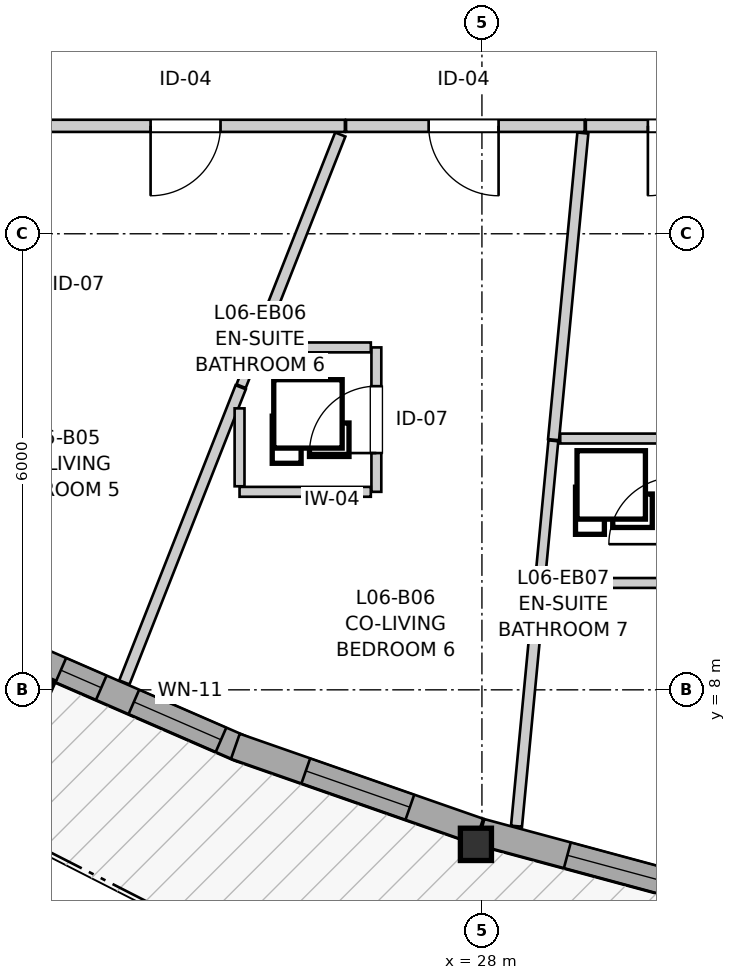
"""IFC4 building model, lengths in metres.
Left out: names, types, materials, properties, quantities, classifications, styles, units other than length and angle.
Written with IfcOpenShell. Run it as: python <this file> out.ifc"""

import sys

from ifc_helpers import new_model, si_unit, direction, frame, frame_2d, origin, origin_2d, place, context, subcontext, project, spatial, rectangle, i_section, extrude, source, transform, mapped, element, fill, save


model = new_model("IFC4")
c1 = context("Model", 3, precision=1e-05, world=origin(), true_north=direction((0.0, 1.0)))
c2 = subcontext(c1, "Body", "Model", "MODEL_VIEW")
j1 = project(units=[si_unit("LENGTHUNIT", "METRE"), si_unit("PLANEANGLEUNIT", "RADIAN")], contexts=[c1])
p1 = place(None, origin())
s1 = spatial("IfcSite", under=j1, at=p1, CompositionType="ELEMENT")
p2 = place(p1, origin())
s2 = spatial("IfcBuilding", under=s1, at=p2, CompositionType="ELEMENT")
p3 = place(p2, frame((0.0, 0.0, 23.8)))
s3 = spatial("IfcBuildingStorey", under=s2, at=p3, CompositionType="ELEMENT", Elevation=23.8)
m1 = source(origin(), c2, "Body", "SweptSolid", [
    extrude(i_section(OverallWidth=0.409, OverallDepth=0.425, WebThickness=0.03, FlangeThickness=0.048, FilletRadius=0.015, at=origin_2d()), origin(), (0.0, 0.0, 1.0), 2.935),
])
p4 = place(p3, frame((27.921, 5.967, 0.0), z_axis=(0.0, 0.0, 1.0), x_axis=(1.0, 0.0, 0.0)))
e1 = element("IfcColumn", 1, at=p4, inside=s3, PredefinedType="PILASTER", context=c2, shape_type="MappedRepresentation", body=[
    mapped(m1, transform((0.0, 0.0, 0.0), x_axis=(1.0, 0.0, 0.0), y_axis=(0.0, 1.0, 0.0), z_axis=(0.0, 0.0, 1.0), scale=1.0)),
])
p5 = place(p3, frame((22.018, 8.451, 0.0), z_axis=(0.0, 0.0, 1.0), x_axis=(0.917071318244, -0.398723208824, 0.0)))
e2 = element("IfcWall", 2, at=p5, inside=s3, PredefinedType="SOLIDWALL", context=c2, shape_type="SweptSolid", body=[
    extrude(rectangle(XDim=3.076, YDim=0.35, at=frame_2d((1.538, 0.0))), origin(), (0.0, 0.0, 1.0), 2.415),
])
p6 = place(p5, frame((0.481, 0.0, 0.82)))
e3 = element("IfcOpeningElement", 3, at=p6, cuts=e2, PredefinedType="OPENING", context=c2, shape_type="SweptSolid", body=[
    extrude(rectangle(XDim=0.58, YDim=1.35, at=frame_2d((0.29, 0.675))), frame((0.0, 0.185, 0.0), z_axis=(0.0, -1.0, 0.0), x_axis=(1.0, 0.0, 0.0)), (0.0, 0.0, 1.0), 0.37),
])
p7 = place(p5, frame((1.529, 0.0, 0.82)))
e4 = element("IfcOpeningElement", 4, at=p7, cuts=e2, PredefinedType="OPENING", context=c2, shape_type="SweptSolid", body=[
    extrude(rectangle(XDim=1.25, YDim=1.35, at=frame_2d((0.625, 0.675))), frame((0.0, 0.185, 0.0), z_axis=(0.0, -1.0, 0.0), x_axis=(1.0, 0.0, 0.0)), (0.0, 0.0, 1.0), 0.37),
])
p8 = place(p3, frame((24.756, 7.257, 0.0), z_axis=(0.0, 0.0, 1.0), x_axis=(0.944142925437, -0.329536244361, 0.0)))
e5 = element("IfcWall", 5, at=p8, inside=s3, PredefinedType="SOLIDWALL", context=c2, shape_type="SweptSolid", body=[
    extrude(rectangle(XDim=3.393, YDim=0.35, at=frame_2d((1.697, 0.0))), origin(), (0.0, 0.0, 1.0), 2.415),
])
p9 = place(p8, frame((0.982, 0.0, 0.82)))
e6 = element("IfcOpeningElement", 6, at=p9, cuts=e5, PredefinedType="OPENING", context=c2, shape_type="SweptSolid", body=[
    extrude(rectangle(XDim=1.45, YDim=1.25, at=frame_2d((0.725, 0.625))), frame((0.0, 0.185, 0.0), z_axis=(0.0, -1.0, 0.0), x_axis=(1.0, 0.0, 0.0)), (0.0, 0.0, 1.0), 0.37),
])
p10 = place(p3, frame((27.986, 6.131, 0.0), z_axis=(0.0, 0.0, 1.0), x_axis=(0.96546113776, -0.2605471003, 0.0)))
e7 = element("IfcWall", 7, at=p10, inside=s3, PredefinedType="SOLIDWALL", context=c2, shape_type="SweptSolid", body=[
    extrude(rectangle(XDim=3.449, YDim=0.35, at=frame_2d((1.725, 0.0))), origin(), (0.0, 0.0, 1.0), 2.415),
])
p11 = place(p10, frame((1.179, 0.0, 0.82)))
e8 = element("IfcOpeningElement", 8, at=p11, cuts=e7, PredefinedType="OPENING", context=c2, shape_type="SweptSolid", body=[
    extrude(rectangle(XDim=1.45, YDim=1.25, at=frame_2d((0.725, 0.625))), frame((0.0, 0.185, 0.0), z_axis=(0.0, -1.0, 0.0), x_axis=(1.0, 0.0, 0.0)), (0.0, 0.0, 1.0), 0.37),
])
p12 = place(p3, frame((26.197, 15.42, 0.0), z_axis=(0.0, 0.0, 1.0), x_axis=(-1.0, 0.0, 0.0)))
e9 = element("IfcWall", 9, at=p12, inside=s3, PredefinedType="PARTITIONING", context=c2, shape_type="SweptSolid", body=[
    extrude(rectangle(XDim=4.177, YDim=0.16, at=frame_2d((2.088, 0.0))), origin(), (0.0, 0.0, 1.0), 2.935),
])
p13 = place(p12, frame((1.636, 0.0, 0.0)))
e10 = element("IfcOpeningElement", 10, at=p13, cuts=e9, PredefinedType="OPENING", context=c2, shape_type="SweptSolid", body=[
    extrude(rectangle(XDim=0.92, YDim=2.1, at=frame_2d((0.46, 1.05))), frame((0.0, 0.09, 0.0), z_axis=(0.0, -1.0, 0.0), x_axis=(1.0, 0.0, 0.0)), (0.0, 0.0, 1.0), 0.18),
])
p14 = place(p3, frame((29.352, 15.42, 0.0), z_axis=(0.0, 0.0, 1.0), x_axis=(-1.0, 0.0, 0.0)))
e11 = element("IfcWall", 11, at=p14, inside=s3, PredefinedType="PARTITIONING", context=c2, shape_type="SweptSolid", body=[
    extrude(rectangle(XDim=3.14, YDim=0.16, at=frame_2d((1.57, 0.0))), origin(), (0.0, 0.0, 1.0), 2.935),
])
p15 = place(p14, frame((1.133, 0.0, 0.0)))
e12 = element("IfcOpeningElement", 12, at=p15, cuts=e11, PredefinedType="OPENING", context=c2, shape_type="SweptSolid", body=[
    extrude(rectangle(XDim=0.92, YDim=2.1, at=frame_2d((0.46, 1.05))), frame((0.0, 0.09, 0.0), z_axis=(0.0, -1.0, 0.0), x_axis=(1.0, 0.0, 0.0)), (0.0, 0.0, 1.0), 0.18),
])
p16 = place(p3, frame((31.965, 15.42, 0.0), z_axis=(0.0, 0.0, 1.0), x_axis=(-1.0, 0.0, 0.0)))
e13 = element("IfcWall", 13, at=p16, inside=s3, PredefinedType="PARTITIONING", context=c2, shape_type="SweptSolid", body=[
    extrude(rectangle(XDim=2.598, YDim=0.16, at=frame_2d((1.299, 0.0))), origin(), (0.0, 0.0, 1.0), 2.935),
])
p17 = place(p16, frame((0.862, 0.0, 0.0)))
e14 = element("IfcOpeningElement", 14, at=p17, cuts=e13, PredefinedType="OPENING", context=c2, shape_type="SweptSolid", body=[
    extrude(rectangle(XDim=0.92, YDim=2.1, at=frame_2d((0.46, 1.05))), frame((0.0, 0.09, 0.0), z_axis=(0.0, -1.0, 0.0), x_axis=(1.0, 0.0, 0.0)), (0.0, 0.0, 1.0), 0.18),
])
p18 = place(p3, frame((26.611, 10.605, 0.0), z_axis=(0.0, 0.0, 1.0), x_axis=(0.0, 1.0, 0.0)))
e15 = element("IfcWall", 15, at=p18, inside=s3, PredefinedType="PARTITIONING", context=c2, shape_type="SweptSolid", body=[
    extrude(rectangle(XDim=1.9, YDim=0.13, at=frame_2d((0.95, 0.0))), origin(), (0.0, 0.0, 1.0), 2.935),
])
p19 = place(p18, frame((0.51, 0.0, 0.0)))
e16 = element("IfcOpeningElement", 16, at=p19, cuts=e15, PredefinedType="OPENING", context=c2, shape_type="SweptSolid", body=[
    extrude(rectangle(XDim=0.88, YDim=2.05, at=frame_2d((0.44, 1.025))), frame((0.0, 0.075, 0.0), z_axis=(0.0, -1.0, 0.0), x_axis=(1.0, 0.0, 0.0)), (0.0, 0.0, 1.0), 0.15),
])
p20 = place(p3, frame((23.295, 8.098, 0.0), z_axis=(0.0, 0.0, 1.0), x_axis=(0.366696366135, 0.930340676883, 0.0)))
e17 = element("IfcWall", 17, at=p20, inside=s3, PredefinedType="PARTITIONING", context=c2, shape_type="SweptSolid", body=[
    extrude(rectangle(XDim=4.174, YDim=0.145, at=frame_2d((2.087, 0.0))), origin(), (0.0, 0.0, 1.0), 2.935),
])
p21 = place(p3, frame((28.942, 11.291, 0.0), z_axis=(0.0, 0.0, 1.0), x_axis=(0.095244050973, 0.995453952101, 0.0)))
e18 = element("IfcWall", 18, at=p21, inside=s3, PredefinedType="PARTITIONING", context=c2, shape_type="SweptSolid", body=[
    extrude(rectangle(XDim=4.052, YDim=0.145, at=frame_2d((2.026, 0.0))), origin(), (0.0, 0.0, 1.0), 2.935),
])
p22 = place(p3, frame((28.455, 6.206, 0.0), z_axis=(0.0, 0.0, 1.0), x_axis=(0.095101625286, 0.995467568968, 0.0)))
e19 = element("IfcWall", 19, at=p22, inside=s3, PredefinedType="PARTITIONING", context=c2, shape_type="SweptSolid", body=[
    extrude(rectangle(XDim=3.229, YDim=0.145, at=frame_2d((1.615, 0.0))), origin(), (0.0, 0.0, 1.0), 2.935),
])
p23 = place(p3, frame((25.026, 12.49, 0.0), z_axis=(0.0, 0.0, 1.0), x_axis=(0.366755134598, 0.930317510985, 0.0)))
e20 = element("IfcWall", 20, at=p23, inside=s3, PredefinedType="PARTITIONING", context=c2, shape_type="SweptSolid", body=[
    extrude(rectangle(XDim=3.027, YDim=0.145, at=frame_2d((1.513, 0.0))), origin(), (0.0, 0.0, 1.0), 2.935),
])
p24 = place(p3, frame((28.764, 9.436, 0.0), z_axis=(0.0, 0.0, 1.0), x_axis=(0.094821557036, 0.995494285429, 0.0)))
e21 = element("IfcWall", 21, at=p24, inside=s3, PredefinedType="PARTITIONING", context=c2, shape_type="SweptSolid", body=[
    extrude(rectangle(XDim=1.849, YDim=0.13, at=frame_2d((0.924, 0.0))), origin(), (0.0, 0.0, 1.0), 2.935),
])
p25 = place(p3, frame((24.811, 10.605, 0.0), z_axis=(0.0, 0.0, 1.0), x_axis=(1.0, 0.0, 0.0)))
e22 = element("IfcWall", 22, at=p25, inside=s3, PredefinedType="PARTITIONING", context=c2, shape_type="SweptSolid", body=[
    extrude(rectangle(XDim=1.727, YDim=0.13, at=frame_2d((0.864, 0.0))), origin(), (0.0, 0.0, 1.0), 2.503),
])
p26 = place(p3, frame((28.848, 9.406, 0.0), z_axis=(0.0, 0.0, 1.0), x_axis=(1.0, 0.0, 0.0)))
e23 = element("IfcWall", 23, at=p26, inside=s3, PredefinedType="PARTITIONING", context=c2, shape_type="SweptSolid", body=[
    extrude(rectangle(XDim=1.629, YDim=0.13, at=frame_2d((0.814, 0.0))), origin(), (0.0, 0.0, 1.0), 2.503),
])
p27 = place(p3, frame((29.03, 11.306, 0.0), z_axis=(0.0, 0.0, 1.0), x_axis=(1.0, 0.0, 0.0)))
e24 = element("IfcWall", 24, at=p27, inside=s3, PredefinedType="PARTITIONING", context=c2, shape_type="SweptSolid", body=[
    extrude(rectangle(XDim=1.447, YDim=0.13, at=frame_2d((0.724, 0.0))), origin(), (0.0, 0.0, 1.0), 2.935),
])
p28 = place(p3, frame((25.144, 12.505, 0.0), z_axis=(0.0, 0.0, 1.0), x_axis=(1.0, 0.0, 0.0)))
e25 = element("IfcWall", 25, at=p28, inside=s3, PredefinedType="PARTITIONING", context=c2, shape_type="SweptSolid", body=[
    extrude(rectangle(XDim=1.395, YDim=0.13, at=frame_2d((0.697, 0.0))), origin(), (0.0, 0.0, 1.0), 2.935),
])
p29 = place(p3, frame((24.811, 10.678, 0.0), z_axis=(0.0, 0.0, 1.0), x_axis=(0.0, 1.0, 0.0)))
e26 = element("IfcWall", 26, at=p29, inside=s3, PredefinedType="PARTITIONING", context=c2, shape_type="SweptSolid", body=[
    extrude(rectangle(XDim=1.025, YDim=0.13, at=frame_2d((0.512, 0.0))), origin(), (0.0, 0.0, 1.0), 2.935),
])
p30 = place(p3, frame((24.831, 11.995, 0.0), z_axis=(0.0, 0.0, 1.0), x_axis=(0.366499739739, 0.93041815372, 0.0)))
e27 = element("IfcWall", 27, at=p30, inside=s3, PredefinedType="PARTITIONING", context=c2, shape_type="SweptSolid", body=[
    extrude(rectangle(XDim=0.517, YDim=0.13, at=frame_2d((0.258, 0.0))), origin(), (0.0, 0.0, 1.0), 2.935),
])
m2 = source(origin(), c2, "Body", "SweptSolid", [
    extrude(rectangle(XDim=0.58, YDim=1.35, at=frame_2d((0.29, 0.675))), frame((0.0, 0.03, 0.0), z_axis=(0.0, -1.0, 0.0), x_axis=(1.0, 0.0, 0.0)), (0.0, 0.0, 1.0), 0.06),
])
p31 = place(p6, origin())
e28 = element("IfcWindow", 28, at=p31, inside=s3, PartitioningType="SINGLE_PANEL", PredefinedType="WINDOW", context=c2, shape_type="MappedRepresentation", body=[
    mapped(m2, transform((0.0, 0.0, 0.0), x_axis=(1.0, 0.0, 0.0), y_axis=(0.0, 1.0, 0.0), z_axis=(0.0, 0.0, 1.0), scale=1.0)),
])
fill(e3, e28)
m3 = source(origin(), c2, "Body", "SweptSolid", [
    extrude(rectangle(XDim=1.25, YDim=1.35, at=frame_2d((0.625, 0.675))), frame((0.0, 0.03, 0.0), z_axis=(0.0, -1.0, 0.0), x_axis=(1.0, 0.0, 0.0)), (0.0, 0.0, 1.0), 0.06),
])
p32 = place(p7, origin())
e29 = element("IfcWindow", 29, at=p32, inside=s3, PartitioningType="SINGLE_PANEL", PredefinedType="WINDOW", context=c2, shape_type="MappedRepresentation", body=[
    mapped(m3, transform((0.0, 0.0, 0.0), x_axis=(1.0, 0.0, 0.0), y_axis=(0.0, 1.0, 0.0), z_axis=(0.0, 0.0, 1.0), scale=1.0)),
])
fill(e4, e29)
m4 = source(origin(), c2, "Body", "SweptSolid", [
    extrude(rectangle(XDim=1.45, YDim=1.25, at=frame_2d((0.725, 0.625))), frame((0.0, 0.03, 0.0), z_axis=(0.0, -1.0, 0.0), x_axis=(1.0, 0.0, 0.0)), (0.0, 0.0, 1.0), 0.06),
])
p33 = place(p9, origin())
e30 = element("IfcWindow", 30, at=p33, inside=s3, PartitioningType="SINGLE_PANEL", PredefinedType="WINDOW", context=c2, shape_type="MappedRepresentation", body=[
    mapped(m4, transform((0.0, 0.0, 0.0), x_axis=(1.0, 0.0, 0.0), y_axis=(0.0, 1.0, 0.0), z_axis=(0.0, 0.0, 1.0), scale=1.0)),
])
fill(e6, e30)
p34 = place(p11, origin())
e31 = element("IfcWindow", 31, at=p34, inside=s3, PartitioningType="SINGLE_PANEL", PredefinedType="WINDOW", context=c2, shape_type="MappedRepresentation", body=[
    mapped(m4, transform((0.0, 0.0, 0.0), x_axis=(1.0, 0.0, 0.0), y_axis=(0.0, 1.0, 0.0), z_axis=(0.0, 0.0, 1.0), scale=1.0)),
])
fill(e8, e31)
m5 = source(origin(), c2, "Body", "SweptSolid", [
    extrude(rectangle(XDim=0.92, YDim=2.1, at=frame_2d((0.46, 1.05))), frame((0.0, 0.025, 0.0), z_axis=(0.0, -1.0, 0.0), x_axis=(1.0, 0.0, 0.0)), (0.0, 0.0, 1.0), 0.05),
])
p35 = place(p13, origin())
e32 = element("IfcDoor", 32, at=p35, inside=s3, OperationType="SINGLE_SWING_RIGHT", PredefinedType="DOOR", context=c2, shape_type="MappedRepresentation", body=[
    mapped(m5, transform((0.0, 0.0, 0.0), x_axis=(1.0, 0.0, 0.0), y_axis=(0.0, 1.0, 0.0), z_axis=(0.0, 0.0, 1.0), scale=1.0)),
])
fill(e10, e32)
p36 = place(p15, origin())
e33 = element("IfcDoor", 33, at=p36, inside=s3, OperationType="SINGLE_SWING_LEFT", PredefinedType="DOOR", context=c2, shape_type="MappedRepresentation", body=[
    mapped(m5, transform((0.0, 0.0, 0.0), x_axis=(1.0, 0.0, 0.0), y_axis=(0.0, 1.0, 0.0), z_axis=(0.0, 0.0, 1.0), scale=1.0)),
])
fill(e12, e33)
p37 = place(p17, origin())
e34 = element("IfcDoor", 34, at=p37, inside=s3, OperationType="SINGLE_SWING_RIGHT", PredefinedType="DOOR", context=c2, shape_type="MappedRepresentation", body=[
    mapped(m5, transform((0.0, 0.0, 0.0), x_axis=(1.0, 0.0, 0.0), y_axis=(0.0, 1.0, 0.0), z_axis=(0.0, 0.0, 1.0), scale=1.0)),
])
fill(e14, e34)
m6 = source(origin(), c2, "Body", "SweptSolid", [
    extrude(rectangle(XDim=0.88, YDim=2.05, at=frame_2d((0.44, 1.025))), frame((0.0, 0.025, 0.0), z_axis=(0.0, -1.0, 0.0), x_axis=(1.0, 0.0, 0.0)), (0.0, 0.0, 1.0), 0.05),
])
p38 = place(p19, origin())
e35 = element("IfcDoor", 35, at=p38, inside=s3, OperationType="SINGLE_SWING_LEFT", PredefinedType="DOOR", context=c2, shape_type="MappedRepresentation", body=[
    mapped(m6, transform((0.0, 0.0, 0.0), x_axis=(1.0, 0.0, 0.0), y_axis=(0.0, 1.0, 0.0), z_axis=(0.0, 0.0, 1.0), scale=1.0)),
])
fill(e16, e35)
save(model, sys.argv[1])
